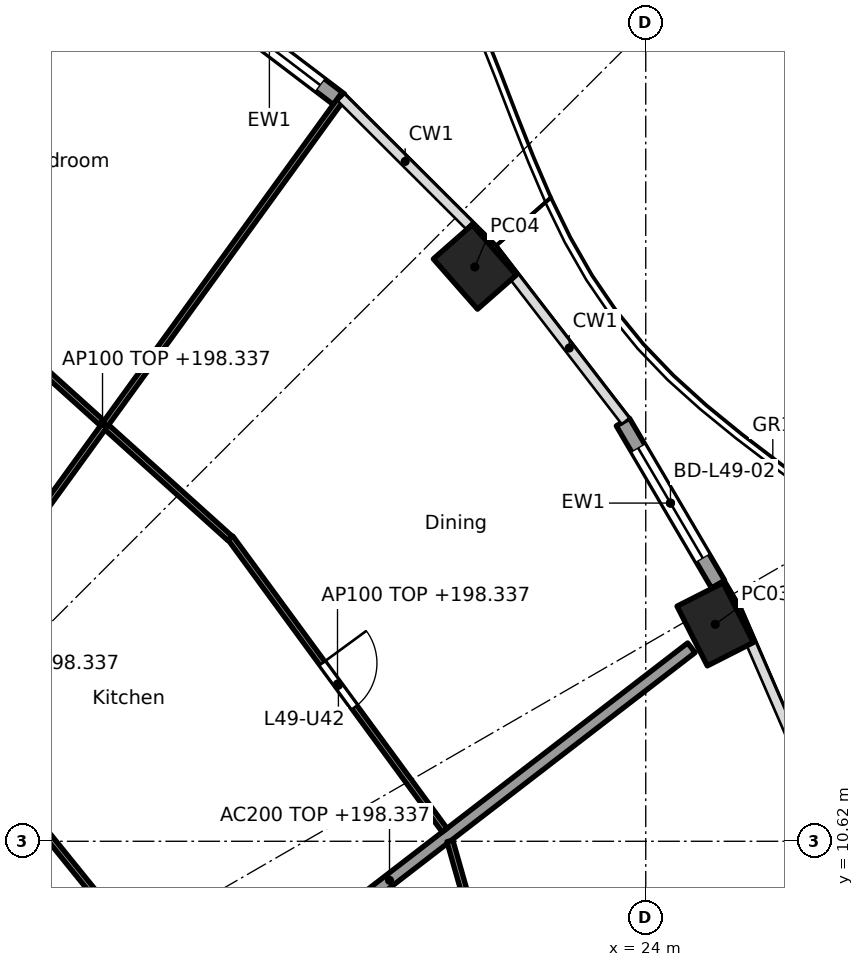
"""IFC4 building model, lengths in metres.
Left out: names, types, materials, properties, quantities, classifications, styles, units other than length and angle.
Written with IfcOpenShell. Run it as: python <this file> out.ifc"""

import sys

from ifc_helpers import new_model, si_unit, direction, frame, frame_2d, origin, origin_2d, place, context, subcontext, project, spatial, rectangle, hollow_rectangle, extrude, element, fill, save


model = new_model("IFC4")
c1 = context("Model", 3, precision=1e-05, world=origin(), true_north=direction((0.0, 1.0)))
c2 = subcontext(c1, "Body", "Model", "MODEL_VIEW")
j1 = project(units=[si_unit("LENGTHUNIT", "METRE"), si_unit("PLANEANGLEUNIT", "RADIAN")], contexts=[c1])
p1 = place(None, origin())
s1 = spatial("IfcSite", under=j1, at=p1, CompositionType="ELEMENT")
p2 = place(p1, origin())
s2 = spatial("IfcBuilding", under=s1, at=p2, CompositionType="ELEMENT")
p3 = place(p2, frame((0.0, 0.0, 195.5)))
s3 = spatial("IfcBuildingStorey", under=s2, at=p3, CompositionType="ELEMENT", Elevation=195.5)
for number, where, z_axis, x_axis in (
    (1, (25.142, 14.188, 0.0), (0.0, 0.0, 1.0), (-0.452, 0.892, 0.0)),
    (2, (21.189, 20.064, 0.0), (0.0, 0.0, 1.0), (-0.66, 0.751, 0.0)),
):
    element("IfcColumn", number, at=place(p3, frame(where, z_axis=z_axis, x_axis=x_axis)), inside=s3, PredefinedType="COLUMN", context=c2, shape_type="SweptSolid", body=[
        extrude(hollow_rectangle(XDim=1.1, YDim=0.85, WallThickness=0.036, at=origin_2d()), origin(), (0.0, 0.0, 1.0), 3.7),
    ])
p4 = place(p3, frame((23.624, 17.515, 0.0), z_axis=(0.0, 0.0, 1.0), x_axis=(0.506367803691, -0.862317602386, 0.0)))
e3 = element("IfcWall", 3, at=p4, inside=s3, PredefinedType="SOLIDWALL", context=c2, shape_type="SweptSolid", body=[
    extrude(rectangle(XDim=3.092, YDim=0.25, at=frame_2d((1.546, 0.0))), origin(), (0.0, 0.0, 1.0), 3.44),
])
p5 = place(p4, frame((0.496, 0.0, 0.0)))
e4 = element("IfcOpeningElement", 4, at=p5, cuts=e3, PredefinedType="OPENING", context=c2, shape_type="SweptSolid", body=[
    extrude(rectangle(XDim=2.1, YDim=2.4, at=frame_2d((1.05, 1.2))), frame((0.0, 0.135, 0.0), z_axis=(0.0, -1.0, 0.0), x_axis=(1.0, 0.0, 0.0)), (0.0, 0.0, 1.0), 0.27),
])
p6 = place(p3, frame((16.65, 24.574, 0.0), z_axis=(0.0, 0.0, 1.0), x_axis=(0.796055733703, -0.60522332146, 0.0)))
e5 = element("IfcWall", 5, at=p6, inside=s3, PredefinedType="SOLIDWALL", context=c2, shape_type="SweptSolid", body=[
    extrude(rectangle(XDim=2.917, YDim=0.25, at=frame_2d((1.458, 0.0))), origin(), (0.0, 0.0, 1.0), 3.44),
])
p7 = place(p6, frame((0.408, 0.0, 0.0)))
e6 = element("IfcOpeningElement", 6, at=p7, cuts=e5, PredefinedType="OPENING", context=c2, shape_type="SweptSolid", body=[
    extrude(rectangle(XDim=2.1, YDim=2.4, at=frame_2d((1.05, 1.2))), frame((0.0, 0.135, 0.0), z_axis=(0.0, -1.0, 0.0), x_axis=(1.0, 0.0, 0.0)), (0.0, 0.0, 1.0), 0.27),
])
p8 = place(p3, frame((14.822, 6.154, 0.0), z_axis=(0.0, 0.0, 1.0), x_axis=(0.792203056092, 0.610257583254, 0.0)))
e7 = element("IfcWall", 7, at=p8, inside=s3, PredefinedType="PARTITIONING", context=c2, shape_type="SweptSolid", body=[
    extrude(rectangle(XDim=12.533, YDim=0.2, at=frame_2d((6.266, 0.0))), origin(), (0.0, 0.0, 1.0), 2.837),
])
p9 = place(p3, frame((22.189, 5.67, 0.0), z_axis=(0.0, 0.0, 1.0), x_axis=(-0.273819702124, 0.961781040949, 0.0)))
e8 = element("IfcWall", 8, at=p9, inside=s3, PredefinedType="PARTITIONING", context=c2, shape_type="SweptSolid", body=[
    extrude(rectangle(XDim=5.152, YDim=0.1, at=frame_2d((2.576, 0.0))), origin(), (0.0, 0.0, 1.0), 2.837),
])
p10 = place(p3, frame((16.626, 7.67, 0.0), z_axis=(0.0, 0.0, 1.0), x_axis=(-0.628764602857, 0.777595700987, 0.0)))
e9 = element("IfcWall", 9, at=p10, inside=s3, PredefinedType="PARTITIONING", context=c2, shape_type="SweptSolid", body=[
    extrude(rectangle(XDim=4.957, YDim=0.1, at=frame_2d((2.479, 0.0))), origin(), (0.0, 0.0, 1.0), 2.837),
])
p11 = place(p3, frame((20.692, 10.802, 0.0), z_axis=(0.0, 0.0, 1.0), x_axis=(-0.591122127251, 0.806582066918, 0.0)))
e10 = element("IfcWall", 10, at=p11, inside=s3, PredefinedType="PARTITIONING", context=c2, shape_type="SweptSolid", body=[
    extrude(rectangle(XDim=5.96, YDim=0.1, at=frame_2d((2.98, 0.0))), origin(), (0.0, 0.0, 1.0), 2.837),
])
p12 = place(p11, frame((2.505, 0.0, 0.0)))
e11 = element("IfcOpeningElement", 11, at=p12, cuts=e10, PredefinedType="OPENING", context=c2, shape_type="SweptSolid", body=[
    extrude(rectangle(XDim=0.9, YDim=2.1, at=frame_2d((0.45, 1.05))), frame((0.0, 0.06, 0.0), z_axis=(0.0, -1.0, 0.0), x_axis=(1.0, 0.0, 0.0)), (0.0, 0.0, 1.0), 0.12),
])
p13 = place(p3, frame((17.162, 15.603, 0.0), z_axis=(0.0, 0.0, 1.0), x_axis=(-0.742768881471, 0.669547898748, 0.0)))
e12 = element("IfcWall", 12, at=p13, inside=s3, PredefinedType="PARTITIONING", context=c2, shape_type="SweptSolid", body=[
    extrude(rectangle(XDim=5.642, YDim=0.1, at=frame_2d((2.821, 0.0))), origin(), (0.0, 0.0, 1.0), 2.837),
])
p14 = place(p3, frame((8.943, 8.966, 0.0), z_axis=(0.0, 0.0, 1.0), x_axis=(0.586803608919, 0.809729290912, 0.0)))
e13 = element("IfcWall", 13, at=p14, inside=s3, PredefinedType="PARTITIONING", context=c2, shape_type="SweptSolid", body=[
    extrude(rectangle(XDim=17.179, YDim=0.1, at=frame_2d((8.589, 0.0))), origin(), (0.0, 0.0, 1.0), 2.756),
])
p15 = place(p14, frame((2.062, 0.0, 0.0)))
e14 = element("IfcOpeningElement", 14, at=p15, cuts=e13, PredefinedType="OPENING", context=c2, shape_type="SweptSolid", body=[
    extrude(rectangle(XDim=0.9, YDim=2.1, at=frame_2d((0.45, 1.05))), frame((0.0, 0.06, 0.0), z_axis=(0.0, -1.0, 0.0), x_axis=(1.0, 0.0, 0.0)), (0.0, 0.0, 1.0), 0.12),
])
p16 = place(p14, frame((7.308, 0.0, 0.0)))
e15 = element("IfcOpeningElement", 15, at=p16, cuts=e13, PredefinedType="OPENING", context=c2, shape_type="SweptSolid", body=[
    extrude(rectangle(XDim=0.9, YDim=2.1, at=frame_2d((0.45, 1.05))), frame((0.0, 0.06, 0.0), z_axis=(0.0, -1.0, 0.0), x_axis=(1.0, 0.0, 0.0)), (0.0, 0.0, 1.0), 0.12),
])
p17 = place(p5, origin())
e16 = element("IfcDoor", 16, at=p17, inside=s3, OperationType="SLIDING_TO_LEFT", PredefinedType="DOOR", context=c2, shape_type="SweptSolid", body=[
    extrude(rectangle(XDim=2.1, YDim=2.4, at=frame_2d((1.05, 1.2))), frame((0.0, 0.025, 0.0), z_axis=(0.0, -1.0, 0.0), x_axis=(1.0, 0.0, 0.0)), (0.0, 0.0, 1.0), 0.05),
])
fill(e4, e16)
p18 = place(p7, origin())
e17 = element("IfcDoor", 17, at=p18, inside=s3, OperationType="SLIDING_TO_LEFT", PredefinedType="DOOR", context=c2, shape_type="SweptSolid", body=[
    extrude(rectangle(XDim=2.1, YDim=2.4, at=frame_2d((1.05, 1.2))), frame((0.0, 0.025, 0.0), z_axis=(0.0, -1.0, 0.0), x_axis=(1.0, 0.0, 0.0)), (0.0, 0.0, 1.0), 0.05),
])
fill(e6, e17)
p19 = place(p12, frame((0.9, 0.0, 0.0), x_axis=(-1.0, 0.0, 0.0)))
e18 = element("IfcDoor", 18, at=p19, inside=s3, OperationType="SINGLE_SWING_LEFT", PredefinedType="DOOR", context=c2, shape_type="SweptSolid", body=[
    extrude(rectangle(XDim=0.9, YDim=2.1, at=frame_2d((0.45, 1.05))), frame((0.0, 0.025, 0.0), z_axis=(0.0, -1.0, 0.0), x_axis=(1.0, 0.0, 0.0)), (0.0, 0.0, 1.0), 0.05),
])
fill(e11, e18)
save(model, sys.argv[1])
